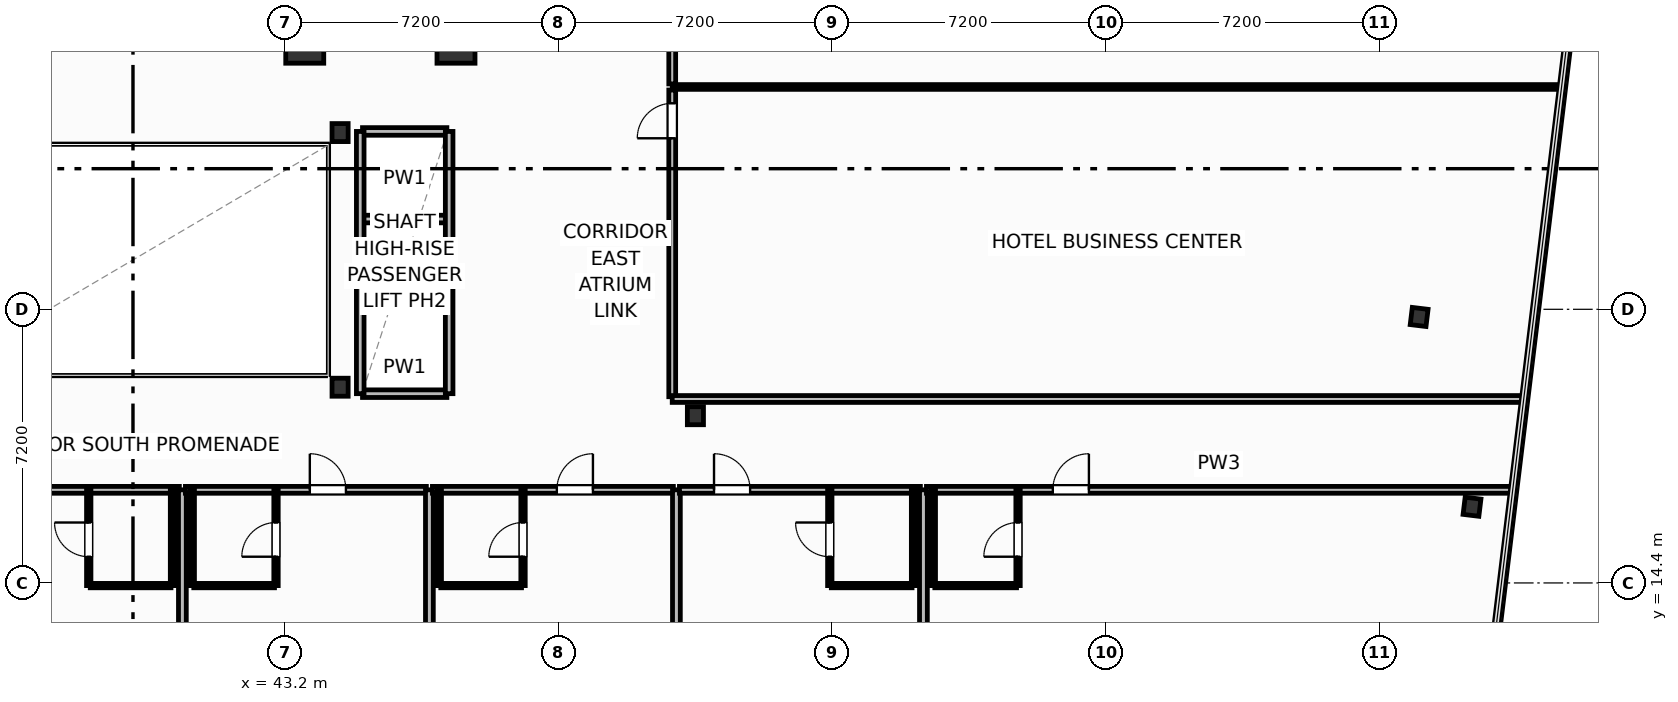
"""IFC4 building model, lengths in metres.
Left out: names, types, materials, properties, quantities, classifications, styles, units other than length and angle.
Written with IfcOpenShell. Run it as: python <this file> out.ifc"""

import sys

from ifc_helpers import new_model, si_unit, direction, frame, frame_2d, origin, origin_2d, place, context, subcontext, project, spatial, rectangle, i_section, extrude, element, fill, save


model = new_model("IFC4")
c1 = context("Model", 3, precision=1e-05, world=origin(), true_north=direction((0.0, 1.0)))
c2 = subcontext(c1, "Body", "Model", "MODEL_VIEW")
j1 = project(units=[si_unit("LENGTHUNIT", "METRE"), si_unit("PLANEANGLEUNIT", "RADIAN")], contexts=[c1])
p1 = place(None, origin())
s1 = spatial("IfcSite", under=j1, at=p1, CompositionType="ELEMENT")
p2 = place(p1, origin())
s2 = spatial("IfcBuilding", under=s1, at=p2, CompositionType="ELEMENT")
p3 = place(p2, frame((0.0, 0.0, 129.1)))
s3 = spatial("IfcBuildingStorey", under=s2, at=p3, CompositionType="ELEMENT", Elevation=129.1)
for number, where, z_axis, x_axis in (
    (1, (43.72, 28.75, 0.0), (0.0, 0.0, 1.0), (1.0, 0.0, 0.0)),
    (2, (47.7, 28.75, 0.0), (0.0, 0.0, 1.0), (1.0, 0.0, 0.0)),
):
    element("IfcColumn", number, at=place(p3, frame(where, z_axis=z_axis, x_axis=x_axis)), inside=s3, PredefinedType="COLUMN", context=c2, shape_type="SweptSolid", body=[
        extrude(rectangle(XDim=1.0, YDim=1.35, at=origin_2d()), origin(), (0.0, 0.0, 1.0), 3.7),
    ])
for number, where, z_axis, x_axis in (
    (3, (44.65, 19.55, 0.0), (0.0, 0.0, 1.0), (1.0, 0.0, 0.0)),
    (4, (44.65, 26.25, 0.0), (0.0, 0.0, 1.0), (1.0, 0.0, 0.0)),
    (5, (54.0, 18.8, 0.0), (0.0, 0.0, 1.0), (1.0, 0.0, 0.0)),
):
    element("IfcColumn", number, at=place(p3, frame(where, z_axis=z_axis, x_axis=x_axis)), inside=s3, PredefinedType="COLUMN", context=c2, shape_type="SweptSolid", body=[
        extrude(i_section(OverallWidth=0.424, OverallDepth=0.474, WebThickness=0.048, FlangeThickness=0.077, FilletRadius=0.025, at=origin_2d()), origin(), (0.0, 0.0, 1.0), 3.7),
    ])
for number, where, z_axis, x_axis in (
    (6, (74.436, 16.405, 0.0), (0.0, 0.0, 1.0), (0.993, -0.12, 0.0)),
    (7, (73.044, 21.399, 0.0), (0.0, 0.0, 1.0), (0.993, -0.12, 0.0)),
):
    element("IfcColumn", number, at=place(p3, frame(where, z_axis=z_axis, x_axis=x_axis)), inside=s3, PredefinedType="COLUMN", context=c2, shape_type="SweptSolid", body=[
        extrude(i_section(OverallWidth=0.418, OverallDepth=0.455, WebThickness=0.042, FlangeThickness=0.068, FilletRadius=0.025, at=origin_2d()), origin(), (0.0, 0.0, 1.0), 3.7),
    ])
p4 = place(p3, frame((34.08, 16.85, 0.0), z_axis=(0.0, 0.0, 1.0), x_axis=(1.0, 0.0, 0.0)))
e8 = element("IfcWall", 8, at=p4, inside=s3, PredefinedType="PARTITIONING", context=c2, shape_type="SweptSolid", body=[
    extrude(rectangle(XDim=6.34, YDim=0.18, at=frame_2d((3.17, 0.0))), origin(), (0.0, 0.0, 1.0), 3.45),
])
p5 = place(p4, frame((0.91, 0.0, 0.0)))
e9 = element("IfcOpeningElement", 9, at=p5, cuts=e8, PredefinedType="OPENING", context=c2, shape_type="SweptSolid", body=[
    extrude(rectangle(XDim=0.95, YDim=2.15, at=frame_2d((0.475, 1.075))), frame((0.0, 0.1, 0.0), z_axis=(0.0, -1.0, 0.0), x_axis=(1.0, 0.0, 0.0)), (0.0, 0.0, 1.0), 0.2),
])
p6 = place(p3, frame((38.076, 14.33, 0.0), z_axis=(0.0, 0.0, 1.0), x_axis=(1.0, 0.0, 0.0)))
e10 = element("IfcWall", 10, at=p6, inside=s3, PredefinedType="PARTITIONING", context=c2, shape_type="SweptSolid", body=[
    extrude(rectangle(XDim=2.124, YDim=0.115, at=frame_2d((1.062, 0.0))), origin(), (0.0, 0.0, 1.0), 3.45),
])
p7 = place(p3, frame((38.036, 14.33, 0.0), z_axis=(0.0, 0.0, 1.0), x_axis=(0.0, 1.0, 0.0)))
e11 = element("IfcWall", 11, at=p7, inside=s3, PredefinedType="PARTITIONING", context=c2, shape_type="SweptSolid", body=[
    extrude(rectangle(XDim=2.52, YDim=0.115, at=frame_2d((1.26, 0.0))), origin(), (0.0, 0.0, 1.0), 3.45),
])
p8 = place(p7, frame((0.76, 0.0, 0.0)))
e12 = element("IfcOpeningElement", 12, at=p8, cuts=e11, PredefinedType="OPENING", context=c2, shape_type="SweptSolid", body=[
    extrude(rectangle(XDim=0.9, YDim=2.05, at=frame_2d((0.45, 1.025))), frame((0.0, 0.067, 0.0), z_axis=(0.0, -1.0, 0.0), x_axis=(1.0, 0.0, 0.0)), (0.0, 0.0, 1.0), 0.135),
])
p9 = place(p3, frame((40.24, 14.33, 0.0), z_axis=(0.0, 0.0, 1.0), x_axis=(0.0, 1.0, 0.0)))
e13 = element("IfcWall", 13, at=p9, inside=s3, PredefinedType="PARTITIONING", context=c2, shape_type="SweptSolid", body=[
    extrude(rectangle(XDim=2.52, YDim=0.115, at=frame_2d((1.26, 0.0))), origin(), (0.0, 0.0, 1.0), 3.45),
])
p10 = place(p3, frame((40.5, 3.077, 0.0), z_axis=(0.0, 0.0, 1.0), x_axis=(0.0, 1.0, 0.0)))
e14 = element("IfcWall", 14, at=p10, inside=s3, PredefinedType="PARTITIONING", context=c2, shape_type="SweptSolid", body=[
    extrude(rectangle(XDim=13.773, YDim=0.205, at=frame_2d((6.887, 0.0))), origin(), (0.0, 0.0, 1.0), 3.45),
])
p11 = place(p3, frame((40.58, 16.85, 0.0), z_axis=(0.0, 0.0, 1.0), x_axis=(1.0, 0.0, 0.0)))
e15 = element("IfcWall", 15, at=p11, inside=s3, PredefinedType="PARTITIONING", context=c2, shape_type="SweptSolid", body=[
    extrude(rectangle(XDim=6.34, YDim=0.18, at=frame_2d((3.17, 0.0))), origin(), (0.0, 0.0, 1.0), 3.45),
])
p12 = place(p11, frame((3.274, 0.0, 0.0)))
e16 = element("IfcOpeningElement", 16, at=p12, cuts=e15, PredefinedType="OPENING", context=c2, shape_type="SweptSolid", body=[
    extrude(rectangle(XDim=0.95, YDim=2.15, at=frame_2d((0.475, 1.075))), frame((0.0, 0.1, 0.0), z_axis=(0.0, -1.0, 0.0), x_axis=(1.0, 0.0, 0.0)), (0.0, 0.0, 1.0), 0.2),
])
p13 = place(p3, frame((40.8, 14.33, 0.0), z_axis=(0.0, 0.0, 1.0), x_axis=(1.0, 0.0, 0.0)))
e17 = element("IfcWall", 17, at=p13, inside=s3, PredefinedType="PARTITIONING", context=c2, shape_type="SweptSolid", body=[
    extrude(rectangle(XDim=2.124, YDim=0.115, at=frame_2d((1.062, 0.0))), origin(), (0.0, 0.0, 1.0), 3.45),
])
p14 = place(p3, frame((42.964, 14.33, 0.0), z_axis=(0.0, 0.0, 1.0), x_axis=(0.0, 1.0, 0.0)))
e18 = element("IfcWall", 18, at=p14, inside=s3, PredefinedType="PARTITIONING", context=c2, shape_type="SweptSolid", body=[
    extrude(rectangle(XDim=2.52, YDim=0.115, at=frame_2d((1.26, 0.0))), origin(), (0.0, 0.0, 1.0), 3.45),
])
p15 = place(p14, frame((0.76, 0.0, 0.0)))
e19 = element("IfcOpeningElement", 19, at=p15, cuts=e18, PredefinedType="OPENING", context=c2, shape_type="SweptSolid", body=[
    extrude(rectangle(XDim=0.9, YDim=2.05, at=frame_2d((0.45, 1.025))), frame((0.0, 0.067, 0.0), z_axis=(0.0, -1.0, 0.0), x_axis=(1.0, 0.0, 0.0)), (0.0, 0.0, 1.0), 0.135),
])
p16 = place(p3, frame((40.76, 14.33, 0.0), z_axis=(0.0, 0.0, 1.0), x_axis=(0.0, 1.0, 0.0)))
e20 = element("IfcWall", 20, at=p16, inside=s3, PredefinedType="PARTITIONING", context=c2, shape_type="SweptSolid", body=[
    extrude(rectangle(XDim=2.52, YDim=0.115, at=frame_2d((1.26, 0.0))), origin(), (0.0, 0.0, 1.0), 3.45),
])
p17 = place(p3, frame((47.0, 3.019, 0.0), z_axis=(0.0, 0.0, 1.0), x_axis=(0.0, 1.0, 0.0)))
e21 = element("IfcWall", 21, at=p17, inside=s3, PredefinedType="PARTITIONING", context=c2, shape_type="SweptSolid", body=[
    extrude(rectangle(XDim=13.831, YDim=0.205, at=frame_2d((6.916, 0.0))), origin(), (0.0, 0.0, 1.0), 3.45),
])
p18 = place(p3, frame((47.08, 16.85, 0.0), z_axis=(0.0, 0.0, 1.0), x_axis=(1.0, 0.0, 0.0)))
e22 = element("IfcWall", 22, at=p18, inside=s3, PredefinedType="PARTITIONING", context=c2, shape_type="SweptSolid", body=[
    extrude(rectangle(XDim=6.34, YDim=0.18, at=frame_2d((3.17, 0.0))), origin(), (0.0, 0.0, 1.0), 3.45),
])
p19 = place(p18, frame((3.274, 0.0, 0.0)))
e23 = element("IfcOpeningElement", 23, at=p19, cuts=e22, PredefinedType="OPENING", context=c2, shape_type="SweptSolid", body=[
    extrude(rectangle(XDim=0.95, YDim=2.15, at=frame_2d((0.475, 1.075))), frame((0.0, 0.1, 0.0), z_axis=(0.0, -1.0, 0.0), x_axis=(1.0, 0.0, 0.0)), (0.0, 0.0, 1.0), 0.2),
])
p20 = place(p3, frame((47.3, 14.33, 0.0), z_axis=(0.0, 0.0, 1.0), x_axis=(1.0, 0.0, 0.0)))
e24 = element("IfcWall", 24, at=p20, inside=s3, PredefinedType="PARTITIONING", context=c2, shape_type="SweptSolid", body=[
    extrude(rectangle(XDim=2.124, YDim=0.115, at=frame_2d((1.062, 0.0))), origin(), (0.0, 0.0, 1.0), 3.45),
])
p21 = place(p3, frame((49.464, 14.33, 0.0), z_axis=(0.0, 0.0, 1.0), x_axis=(0.0, 1.0, 0.0)))
e25 = element("IfcWall", 25, at=p21, inside=s3, PredefinedType="PARTITIONING", context=c2, shape_type="SweptSolid", body=[
    extrude(rectangle(XDim=2.52, YDim=0.115, at=frame_2d((1.26, 0.0))), origin(), (0.0, 0.0, 1.0), 3.45),
])
p22 = place(p21, frame((0.76, 0.0, 0.0)))
e26 = element("IfcOpeningElement", 26, at=p22, cuts=e25, PredefinedType="OPENING", context=c2, shape_type="SweptSolid", body=[
    extrude(rectangle(XDim=0.9, YDim=2.05, at=frame_2d((0.45, 1.025))), frame((0.0, 0.067, 0.0), z_axis=(0.0, -1.0, 0.0), x_axis=(1.0, 0.0, 0.0)), (0.0, 0.0, 1.0), 0.135),
])
p23 = place(p3, frame((47.26, 14.33, 0.0), z_axis=(0.0, 0.0, 1.0), x_axis=(0.0, 1.0, 0.0)))
e27 = element("IfcWall", 27, at=p23, inside=s3, PredefinedType="PARTITIONING", context=c2, shape_type="SweptSolid", body=[
    extrude(rectangle(XDim=2.52, YDim=0.115, at=frame_2d((1.26, 0.0))), origin(), (0.0, 0.0, 1.0), 3.45),
])
p24 = place(p3, frame((53.5, 0.136, 0.0), z_axis=(0.0, 0.0, 1.0), x_axis=(0.0, 1.0, 0.0)))
e28 = element("IfcWall", 28, at=p24, inside=s3, PredefinedType="PARTITIONING", context=c2, shape_type="SweptSolid", body=[
    extrude(rectangle(XDim=16.714, YDim=0.205, at=frame_2d((8.357, 0.0))), origin(), (0.0, 0.0, 1.0), 3.45),
])
p25 = place(p3, frame((53.58, 16.85, 0.0), z_axis=(0.0, 0.0, 1.0), x_axis=(1.0, 0.0, 0.0)))
e29 = element("IfcWall", 29, at=p25, inside=s3, PredefinedType="PARTITIONING", context=c2, shape_type="SweptSolid", body=[
    extrude(rectangle(XDim=6.34, YDim=0.18, at=frame_2d((3.17, 0.0))), origin(), (0.0, 0.0, 1.0), 3.45),
])
p26 = place(p25, frame((0.91, 0.0, 0.0)))
e30 = element("IfcOpeningElement", 30, at=p26, cuts=e29, PredefinedType="OPENING", context=c2, shape_type="SweptSolid", body=[
    extrude(rectangle(XDim=0.95, YDim=2.15, at=frame_2d((0.475, 1.075))), frame((0.0, 0.1, 0.0), z_axis=(0.0, -1.0, 0.0), x_axis=(1.0, 0.0, 0.0)), (0.0, 0.0, 1.0), 0.2),
])
p27 = place(p3, frame((57.576, 14.33, 0.0), z_axis=(0.0, 0.0, 1.0), x_axis=(1.0, 0.0, 0.0)))
e31 = element("IfcWall", 31, at=p27, inside=s3, PredefinedType="PARTITIONING", context=c2, shape_type="SweptSolid", body=[
    extrude(rectangle(XDim=2.124, YDim=0.115, at=frame_2d((1.062, 0.0))), origin(), (0.0, 0.0, 1.0), 3.45),
])
p28 = place(p3, frame((57.536, 14.33, 0.0), z_axis=(0.0, 0.0, 1.0), x_axis=(0.0, 1.0, 0.0)))
e32 = element("IfcWall", 32, at=p28, inside=s3, PredefinedType="PARTITIONING", context=c2, shape_type="SweptSolid", body=[
    extrude(rectangle(XDim=2.52, YDim=0.115, at=frame_2d((1.26, 0.0))), origin(), (0.0, 0.0, 1.0), 3.45),
])
p29 = place(p28, frame((0.76, 0.0, 0.0)))
e33 = element("IfcOpeningElement", 33, at=p29, cuts=e32, PredefinedType="OPENING", context=c2, shape_type="SweptSolid", body=[
    extrude(rectangle(XDim=0.9, YDim=2.05, at=frame_2d((0.45, 1.025))), frame((0.0, 0.067, 0.0), z_axis=(0.0, -1.0, 0.0), x_axis=(1.0, 0.0, 0.0)), (0.0, 0.0, 1.0), 0.135),
])
p30 = place(p3, frame((59.74, 14.33, 0.0), z_axis=(0.0, 0.0, 1.0), x_axis=(0.0, 1.0, 0.0)))
e34 = element("IfcWall", 34, at=p30, inside=s3, PredefinedType="PARTITIONING", context=c2, shape_type="SweptSolid", body=[
    extrude(rectangle(XDim=2.52, YDim=0.115, at=frame_2d((1.26, 0.0))), origin(), (0.0, 0.0, 1.0), 3.45),
])
p31 = place(p3, frame((60.0, -0.652, 0.0), z_axis=(0.0, 0.0, 1.0), x_axis=(0.0, 1.0, 0.0)))
e35 = element("IfcWall", 35, at=p31, inside=s3, PredefinedType="PARTITIONING", context=c2, shape_type="SweptSolid", body=[
    extrude(rectangle(XDim=17.502, YDim=0.205, at=frame_2d((8.751, 0.0))), origin(), (0.0, 0.0, 1.0), 3.45),
])
p32 = place(p3, frame((60.08, 16.85, 0.0), z_axis=(0.0, 0.0, 1.0), x_axis=(1.0, 0.0, 0.0)))
e36 = element("IfcWall", 36, at=p32, inside=s3, PredefinedType="PARTITIONING", context=c2, shape_type="SweptSolid", body=[
    extrude(rectangle(XDim=15.387, YDim=0.18, at=frame_2d((7.693, 0.0))), origin(), (0.0, 0.0, 1.0), 3.45),
])
p33 = place(p32, frame((3.325, 0.0, 0.0)))
e37 = element("IfcOpeningElement", 37, at=p33, cuts=e36, PredefinedType="OPENING", context=c2, shape_type="SweptSolid", body=[
    extrude(rectangle(XDim=0.95, YDim=2.15, at=frame_2d((0.475, 1.075))), frame((0.0, 0.1, 0.0), z_axis=(0.0, -1.0, 0.0), x_axis=(1.0, 0.0, 0.0)), (0.0, 0.0, 1.0), 0.2),
])
p34 = place(p3, frame((60.3, 14.33, 0.0), z_axis=(0.0, 0.0, 1.0), x_axis=(1.0, 0.0, 0.0)))
e38 = element("IfcWall", 38, at=p34, inside=s3, PredefinedType="PARTITIONING", context=c2, shape_type="SweptSolid", body=[
    extrude(rectangle(XDim=2.15, YDim=0.115, at=frame_2d((1.075, 0.0))), origin(), (0.0, 0.0, 1.0), 3.45),
])
p35 = place(p3, frame((62.49, 14.33, 0.0), z_axis=(0.0, 0.0, 1.0), x_axis=(0.0, 1.0, 0.0)))
e39 = element("IfcWall", 39, at=p35, inside=s3, PredefinedType="PARTITIONING", context=c2, shape_type="SweptSolid", body=[
    extrude(rectangle(XDim=2.52, YDim=0.115, at=frame_2d((1.26, 0.0))), origin(), (0.0, 0.0, 1.0), 3.45),
])
p36 = place(p35, frame((0.76, 0.0, 0.0)))
e40 = element("IfcOpeningElement", 40, at=p36, cuts=e39, PredefinedType="OPENING", context=c2, shape_type="SweptSolid", body=[
    extrude(rectangle(XDim=0.9, YDim=2.05, at=frame_2d((0.45, 1.025))), frame((0.0, 0.067, 0.0), z_axis=(0.0, -1.0, 0.0), x_axis=(1.0, 0.0, 0.0)), (0.0, 0.0, 1.0), 0.135),
])
p37 = place(p3, frame((60.26, 14.33, 0.0), z_axis=(0.0, 0.0, 1.0), x_axis=(0.0, 1.0, 0.0)))
e41 = element("IfcWall", 41, at=p37, inside=s3, PredefinedType="PARTITIONING", context=c2, shape_type="SweptSolid", body=[
    extrude(rectangle(XDim=2.52, YDim=0.115, at=frame_2d((1.26, 0.0))), origin(), (0.0, 0.0, 1.0), 3.45),
])
p38 = place(p3, frame((53.39, 19.3, 0.0), z_axis=(0.0, 0.0, 1.0), x_axis=(0.0, 1.0, 0.0)))
e42 = element("IfcWall", 42, at=p38, inside=s3, PredefinedType="PARTITIONING", context=c2, shape_type="SweptSolid", body=[
    extrude(rectangle(XDim=8.07, YDim=0.18, at=frame_2d((4.035, 0.0))), origin(), (0.0, 0.0, 1.0), 3.45),
])
p39 = place(p38, frame((6.8, 0.0, 0.0)))
e43 = element("IfcOpeningElement", 43, at=p39, cuts=e42, PredefinedType="OPENING", context=c2, shape_type="SweptSolid", body=[
    extrude(rectangle(XDim=0.92, YDim=2.05, at=frame_2d((0.46, 1.025))), frame((0.0, 0.1, 0.0), z_axis=(0.0, -1.0, 0.0), x_axis=(1.0, 0.0, 0.0)), (0.0, 0.0, 1.0), 0.2),
])
p40 = place(p3, frame((53.39, 27.53, 0.0), z_axis=(0.0, 0.0, 1.0), x_axis=(0.0, 1.0, 0.0)))
e44 = element("IfcWall", 44, at=p40, inside=s3, PredefinedType="PARTITIONING", context=c2, shape_type="SweptSolid", body=[
    extrude(rectangle(XDim=11.67, YDim=0.18, at=frame_2d((5.835, 0.0))), origin(), (0.0, 0.0, 1.0), 3.45),
])
p41 = place(p40, frame((5.8, 0.0, 0.0)))
e45 = element("IfcOpeningElement", 45, at=p41, cuts=e44, PredefinedType="OPENING", context=c2, shape_type="SweptSolid", body=[
    extrude(rectangle(XDim=0.92, YDim=2.05, at=frame_2d((0.46, 1.025))), frame((0.0, 0.1, 0.0), z_axis=(0.0, -1.0, 0.0), x_axis=(1.0, 0.0, 0.0)), (0.0, 0.0, 1.0), 0.2),
])
p42 = place(p3, frame((53.39, 27.45, 0.0), z_axis=(0.0, 0.0, 1.0), x_axis=(1.0, 0.0, 0.0)))
e46 = element("IfcWall", 46, at=p42, inside=s3, PredefinedType="PARTITIONING", context=c2, shape_type="SweptSolid", body=[
    extrude(rectangle(XDim=23.362, YDim=0.125, at=frame_2d((11.681, 0.0))), origin(), (0.0, 0.0, 1.0), 3.45),
])
p43 = place(p3, frame((53.39, 19.24, 0.0), z_axis=(0.0, 0.0, 1.0), x_axis=(1.0, 0.0, 0.0)))
e47 = element("IfcWall", 47, at=p43, inside=s3, PredefinedType="PARTITIONING", context=c2, shape_type="SweptSolid", body=[
    extrude(rectangle(XDim=22.367, YDim=0.18, at=frame_2d((11.183, 0.0))), origin(), (0.0, 0.0, 1.0), 2.662),
])
for number, where, z_axis, x_axis in (
    (48, (45.24, 21.675, 0.0), (0.0, 0.0, 1.0), (1.0, 0.0, 0.0)),
    (49, (45.24, 23.975, 0.0), (0.0, 0.0, 1.0), (1.0, 0.0, 0.0)),
):
    element("IfcWall", number, at=place(p3, frame(where, z_axis=z_axis, x_axis=x_axis)), inside=s3, PredefinedType="PARTITIONING", context=c2, shape_type="SweptSolid", body=[
        extrude(rectangle(XDim=2.22, YDim=0.2, at=frame_2d((1.11, 0.0))), origin(), (0.0, 0.0, 1.0), 3.45),
    ])
p44 = place(p3, frame((45.24, 19.38, 0.0), z_axis=(0.0, 0.0, 1.0), x_axis=(1.0, 0.0, 0.0)))
e50 = element("IfcWall", 50, at=p44, inside=s3, PredefinedType="PARTITIONING", context=c2, shape_type="SweptSolid", body=[
    extrude(rectangle(XDim=2.22, YDim=0.2, at=frame_2d((1.11, 0.0))), origin(), (0.0, 0.0, 1.0), 2.662),
])
p45 = place(p3, frame((45.24, 26.28, 0.0), z_axis=(0.0, 0.0, 1.0), x_axis=(1.0, 0.0, 0.0)))
e51 = element("IfcWall", 51, at=p45, inside=s3, PredefinedType="PARTITIONING", context=c2, shape_type="SweptSolid", body=[
    extrude(rectangle(XDim=2.22, YDim=0.2, at=frame_2d((1.11, 0.0))), origin(), (0.0, 0.0, 1.0), 3.45),
])
for number, where, z_axis, x_axis in (
    (52, (45.18, 19.38, 0.0), (0.0, 0.0, 1.0), (0.0, 1.0, 0.0)),
    (53, (47.52, 19.38, 0.0), (0.0, 0.0, 1.0), (0.0, 1.0, 0.0)),
):
    element("IfcWall", number, at=place(p3, frame(where, z_axis=z_axis, x_axis=x_axis)), inside=s3, PredefinedType="PARTITIONING", context=c2, shape_type="SweptSolid", body=[
        extrude(rectangle(XDim=6.9, YDim=0.2, at=frame_2d((3.45, 0.0))), origin(), (0.0, 0.0, 1.0), 3.45),
    ])
p46 = place(p8, origin())
e54 = element("IfcDoor", 54, at=p46, inside=s3, OperationType="SINGLE_SWING_RIGHT", PredefinedType="DOOR", context=c2, shape_type="SweptSolid", body=[
    extrude(rectangle(XDim=0.9, YDim=2.05, at=frame_2d((0.45, 1.025))), frame((0.0, 0.025, 0.0), z_axis=(0.0, -1.0, 0.0), x_axis=(1.0, 0.0, 0.0)), (0.0, 0.0, 1.0), 0.05),
])
fill(e12, e54)
p47 = place(p12, origin())
e55 = element("IfcDoor", 55, at=p47, inside=s3, OperationType="SINGLE_SWING_LEFT", PredefinedType="DOOR", context=c2, shape_type="SweptSolid", body=[
    extrude(rectangle(XDim=0.95, YDim=2.15, at=frame_2d((0.475, 1.075))), frame((0.0, 0.025, 0.0), z_axis=(0.0, -1.0, 0.0), x_axis=(1.0, 0.0, 0.0)), (0.0, 0.0, 1.0), 0.05),
])
fill(e16, e55)
p48 = place(p15, origin())
e56 = element("IfcDoor", 56, at=p48, inside=s3, OperationType="SINGLE_SWING_LEFT", PredefinedType="DOOR", context=c2, shape_type="SweptSolid", body=[
    extrude(rectangle(XDim=0.9, YDim=2.05, at=frame_2d((0.45, 1.025))), frame((0.0, 0.025, 0.0), z_axis=(0.0, -1.0, 0.0), x_axis=(1.0, 0.0, 0.0)), (0.0, 0.0, 1.0), 0.05),
])
fill(e19, e56)
p49 = place(p19, origin())
e57 = element("IfcDoor", 57, at=p49, inside=s3, OperationType="SINGLE_SWING_RIGHT", PredefinedType="DOOR", context=c2, shape_type="SweptSolid", body=[
    extrude(rectangle(XDim=0.95, YDim=2.15, at=frame_2d((0.475, 1.075))), frame((0.0, 0.025, 0.0), z_axis=(0.0, -1.0, 0.0), x_axis=(1.0, 0.0, 0.0)), (0.0, 0.0, 1.0), 0.05),
])
fill(e23, e57)
p50 = place(p22, origin())
e58 = element("IfcDoor", 58, at=p50, inside=s3, OperationType="SINGLE_SWING_LEFT", PredefinedType="DOOR", context=c2, shape_type="SweptSolid", body=[
    extrude(rectangle(XDim=0.9, YDim=2.05, at=frame_2d((0.45, 1.025))), frame((0.0, 0.025, 0.0), z_axis=(0.0, -1.0, 0.0), x_axis=(1.0, 0.0, 0.0)), (0.0, 0.0, 1.0), 0.05),
])
fill(e26, e58)
p51 = place(p26, origin())
e59 = element("IfcDoor", 59, at=p51, inside=s3, OperationType="SINGLE_SWING_LEFT", PredefinedType="DOOR", context=c2, shape_type="SweptSolid", body=[
    extrude(rectangle(XDim=0.95, YDim=2.15, at=frame_2d((0.475, 1.075))), frame((0.0, 0.025, 0.0), z_axis=(0.0, -1.0, 0.0), x_axis=(1.0, 0.0, 0.0)), (0.0, 0.0, 1.0), 0.05),
])
fill(e30, e59)
p52 = place(p29, origin())
e60 = element("IfcDoor", 60, at=p52, inside=s3, OperationType="SINGLE_SWING_RIGHT", PredefinedType="DOOR", context=c2, shape_type="SweptSolid", body=[
    extrude(rectangle(XDim=0.9, YDim=2.05, at=frame_2d((0.45, 1.025))), frame((0.0, 0.025, 0.0), z_axis=(0.0, -1.0, 0.0), x_axis=(1.0, 0.0, 0.0)), (0.0, 0.0, 1.0), 0.05),
])
fill(e33, e60)
p53 = place(p33, origin())
e61 = element("IfcDoor", 61, at=p53, inside=s3, OperationType="SINGLE_SWING_RIGHT", PredefinedType="DOOR", context=c2, shape_type="SweptSolid", body=[
    extrude(rectangle(XDim=0.95, YDim=2.15, at=frame_2d((0.475, 1.075))), frame((0.0, 0.025, 0.0), z_axis=(0.0, -1.0, 0.0), x_axis=(1.0, 0.0, 0.0)), (0.0, 0.0, 1.0), 0.05),
])
fill(e37, e61)
p54 = place(p36, origin())
e62 = element("IfcDoor", 62, at=p54, inside=s3, OperationType="SINGLE_SWING_LEFT", PredefinedType="DOOR", context=c2, shape_type="SweptSolid", body=[
    extrude(rectangle(XDim=0.9, YDim=2.05, at=frame_2d((0.45, 1.025))), frame((0.0, 0.025, 0.0), z_axis=(0.0, -1.0, 0.0), x_axis=(1.0, 0.0, 0.0)), (0.0, 0.0, 1.0), 0.05),
])
fill(e40, e62)
p55 = place(p39, origin())
e63 = element("IfcDoor", 63, at=p55, inside=s3, OperationType="SINGLE_SWING_LEFT", PredefinedType="DOOR", context=c2, shape_type="SweptSolid", body=[
    extrude(rectangle(XDim=0.92, YDim=2.05, at=frame_2d((0.46, 1.025))), frame((0.0, 0.025, 0.0), z_axis=(0.0, -1.0, 0.0), x_axis=(1.0, 0.0, 0.0)), (0.0, 0.0, 1.0), 0.05),
])
fill(e43, e63)
save(model, sys.argv[1])
